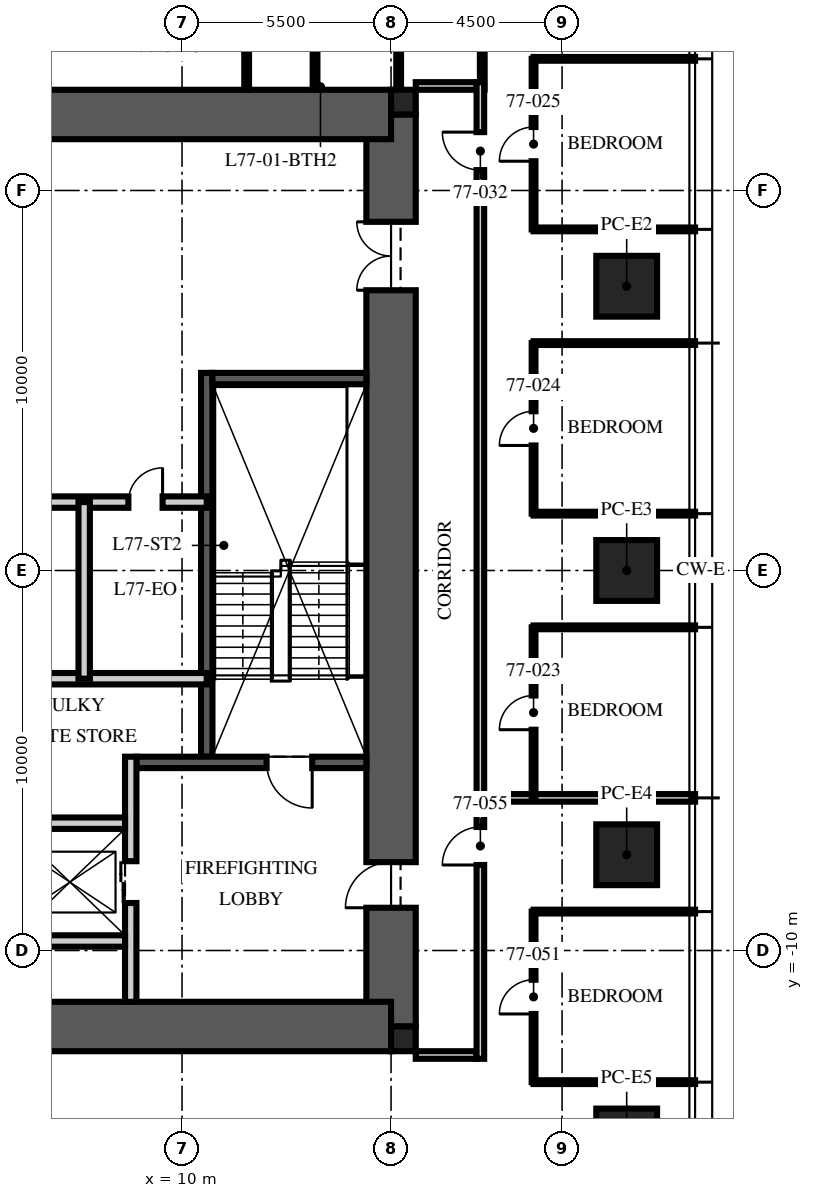
"""IFC4 building model, lengths in metres.
Left out: names, types, materials, properties, quantities, classifications, styles, units other than length and angle.
Written with IfcOpenShell. Run it as: python <this file> out.ifc"""

import sys

from ifc_helpers import new_model, si_unit, direction, frame, frame_2d, origin, origin_2d, place, context, subcontext, project, spatial, rectangle, extrude, element, fill, save


model = new_model("IFC4")
c1 = context("Model", 3, precision=1e-05, world=origin(), true_north=direction((0.0, 1.0)))
c2 = subcontext(c1, "Body", "Model", "MODEL_VIEW")
j1 = project(units=[si_unit("LENGTHUNIT", "METRE"), si_unit("PLANEANGLEUNIT", "RADIAN")], contexts=[c1])
p1 = place(None, origin())
s1 = spatial("IfcSite", under=j1, at=p1, CompositionType="ELEMENT")
p2 = place(p1, origin())
s2 = spatial("IfcBuilding", under=s1, at=p2, CompositionType="ELEMENT")
p3 = place(p2, frame((0.0, 0.0, 308.25)))
s3 = spatial("IfcBuildingStorey", under=s2, at=p3, CompositionType="ELEMENT", Elevation=308.25)
p4 = place(p3, frame((15.5, -12.0, -0.25), z_axis=(0.0, 0.0, 1.0), x_axis=(0.0, 1.0, 0.0)))
e1 = element("IfcWall", 1, at=p4, inside=s3, PredefinedType="SHEAR", context=c2, shape_type="SweptSolid", body=[
    extrude(rectangle(XDim=24.0, YDim=1.3, at=frame_2d((12.0, 0.0))), origin(), (0.0, 0.0, 1.0), 3.75),
])
p5 = place(p4, frame((3.125, 0.0, 0.25)))
e2 = element("IfcOpeningElement", 2, at=p5, cuts=e1, PredefinedType="OPENING", context=c2, shape_type="SweptSolid", body=[
    extrude(rectangle(XDim=1.2, YDim=2.1, at=frame_2d((0.6, 1.05))), frame((0.0, 0.66, 0.0), z_axis=(0.0, -1.0, 0.0), x_axis=(1.0, 0.0, 0.0)), (0.0, 0.0, 1.0), 1.32),
])
p6 = place(p4, frame((19.375, 0.0, 0.25)))
e3 = element("IfcOpeningElement", 3, at=p6, cuts=e1, PredefinedType="OPENING", context=c2, shape_type="SweptSolid", body=[
    extrude(rectangle(XDim=1.8, YDim=2.1, at=frame_2d((0.9, 1.05))), frame((0.0, 0.66, 0.0), z_axis=(0.0, -1.0, 0.0), x_axis=(1.0, 0.0, 0.0)), (0.0, 0.0, 1.0), 1.32),
])
for number, where, z_axis, x_axis in (
    (4, (-15.5, 12.0, -0.25), (0.0, 0.0, 1.0), (1.0, 0.0, 0.0)),
    (5, (-15.5, -12.0, -0.25), (0.0, 0.0, 1.0), (1.0, 0.0, 0.0)),
):
    element("IfcWall", number, at=place(p3, frame(where, z_axis=z_axis, x_axis=x_axis)), inside=s3, PredefinedType="SHEAR", context=c2, shape_type="SweptSolid", body=[
        extrude(rectangle(XDim=31.0, YDim=1.3, at=frame_2d((15.5, 0.0))), origin(), (0.0, 0.0, 1.0), 3.75),
    ])
for number, where, z_axis, x_axis in (
    (6, (15.825, 12.325, -0.25), (0.0, 0.0, 1.0), (1.0, 0.0, 0.0)),
    (7, (15.825, -12.325, -0.25), (0.0, 0.0, 1.0), (1.0, 0.0, 0.0)),
):
    element("IfcColumn", number, at=place(p3, frame(where, z_axis=z_axis, x_axis=x_axis)), inside=s3, PredefinedType="COLUMN", context=c2, shape_type="SweptSolid", body=[
        extrude(rectangle(XDim=0.65, YDim=0.65, at=origin_2d()), origin(), (0.0, 0.0, 1.0), 3.75),
    ])
for number, where, z_axis, x_axis in (
    (8, (21.7, 7.48, 0.0), (0.0, 0.0, 1.0), (0.0, 1.0, 0.0)),
    (9, (21.7, 0.0, 0.0), (0.0, 0.0, 1.0), (0.0, 1.0, 0.0)),
    (10, (21.7, -7.48, 0.0), (0.0, 0.0, 1.0), (0.0, 1.0, 0.0)),
    (11, (21.7, -14.96, 0.0), (0.0, 0.0, 1.0), (0.0, 1.0, 0.0)),
):
    element("IfcColumn", number, at=place(p3, frame(where, z_axis=z_axis, x_axis=x_axis)), inside=s3, PredefinedType="COLUMN", context=c2, shape_type="SweptSolid", body=[
        extrude(rectangle(XDim=1.6, YDim=1.6, at=origin_2d()), origin(), (0.0, 0.0, 1.0), 3.75),
    ])
p7 = place(p3, frame((10.65, -4.9, 0.0), z_axis=(0.0, 0.0, 1.0), x_axis=(0.0, 1.0, 0.0)))
e12 = element("IfcWall", 12, at=p7, inside=s3, PredefinedType="SOLIDWALL", context=c2, shape_type="SweptSolid", body=[
    extrude(rectangle(XDim=10.1, YDim=0.3, at=frame_2d((5.05, 0.0))), origin(), (0.0, 0.0, 1.0), 3.5),
])
p8 = place(p3, frame((14.85, -5.05, 0.0), z_axis=(0.0, 0.0, 1.0), x_axis=(-1.0, 0.0, 0.0)))
e13 = element("IfcWall", 13, at=p8, inside=s3, PredefinedType="SOLIDWALL", context=c2, shape_type="SweptSolid", body=[
    extrude(rectangle(XDim=6.05, YDim=0.3, at=frame_2d((3.025, 0.0))), origin(), (0.0, 0.0, 1.0), 3.5),
])
p9 = place(p8, frame((1.425, 0.0, 0.0)))
e14 = element("IfcOpeningElement", 14, at=p9, cuts=e13, PredefinedType="OPENING", context=c2, shape_type="SweptSolid", body=[
    extrude(rectangle(XDim=1.2, YDim=2.1, at=frame_2d((0.6, 1.05))), frame((0.0, 0.16, 0.0), z_axis=(0.0, -1.0, 0.0), x_axis=(1.0, 0.0, 0.0)), (0.0, 0.0, 1.0), 0.32),
])
p10 = place(p3, frame((14.85, 5.05, 0.0), z_axis=(0.0, 0.0, 1.0), x_axis=(-1.0, 0.0, 0.0)))
e15 = element("IfcWall", 15, at=p10, inside=s3, PredefinedType="SOLIDWALL", context=c2, shape_type="SweptSolid", body=[
    extrude(rectangle(XDim=4.05, YDim=0.3, at=frame_2d((2.025, 0.0))), origin(), (0.0, 0.0, 1.0), 3.5),
])
p11 = place(p3, frame((8.65, -11.35, 0.0), z_axis=(0.0, 0.0, 1.0), x_axis=(0.0, 1.0, 0.0)))
e16 = element("IfcWall", 16, at=p11, inside=s3, PredefinedType="PARTITIONING", context=c2, shape_type="SweptSolid", body=[
    extrude(rectangle(XDim=6.45, YDim=0.3, at=frame_2d((3.225, 0.0))), origin(), (0.0, 0.0, 1.0), 3.5),
])
p12 = place(p11, frame((2.6, 0.0, 0.0)))
e17 = element("IfcOpeningElement", 17, at=p12, cuts=e16, PredefinedType="OPENING", context=c2, shape_type="SweptSolid", body=[
    extrude(rectangle(XDim=1.1, YDim=2.1, at=frame_2d((0.55, 1.05))), frame((0.0, 0.16, 0.0), z_axis=(0.0, -1.0, 0.0), x_axis=(1.0, 0.0, 0.0)), (0.0, 0.0, 1.0), 0.32),
])
p13 = place(p3, frame((-8.5, -6.65, 0.0), z_axis=(0.0, 0.0, 1.0), x_axis=(1.0, 0.0, 0.0)))
e18 = element("IfcWall", 18, at=p13, inside=s3, PredefinedType="PARTITIONING", context=c2, shape_type="SweptSolid", body=[
    extrude(rectangle(XDim=17.0, YDim=0.3, at=frame_2d((8.5, 0.0))), origin(), (0.0, 0.0, 1.0), 3.5),
])
p14 = place(p13, frame((7.8, 0.0, 0.0)))
e19 = element("IfcOpeningElement", 19, at=p14, cuts=e18, PredefinedType="OPENING", context=c2, shape_type="SweptSolid", body=[
    extrude(rectangle(XDim=1.3, YDim=2.4, at=frame_2d((0.65, 1.2))), frame((0.0, 0.16, 0.0), z_axis=(0.0, -1.0, 0.0), x_axis=(1.0, 0.0, 0.0)), (0.0, 0.0, 1.0), 0.32),
])
p15 = place(p13, frame((5.65, 0.0, 0.0)))
e20 = element("IfcOpeningElement", 20, at=p15, cuts=e18, PredefinedType="OPENING", context=c2, shape_type="SweptSolid", body=[
    extrude(rectangle(XDim=0.9, YDim=2.1, at=frame_2d((0.45, 1.05))), frame((0.0, 0.16, 0.0), z_axis=(0.0, -1.0, 0.0), x_axis=(1.0, 0.0, 0.0)), (0.0, 0.0, 1.0), 0.32),
])
p16 = place(p13, frame((10.4, 0.0, 0.0)))
e21 = element("IfcOpeningElement", 21, at=p16, cuts=e18, PredefinedType="OPENING", context=c2, shape_type="SweptSolid", body=[
    extrude(rectangle(XDim=0.9, YDim=2.1, at=frame_2d((0.45, 1.05))), frame((0.0, 0.16, 0.0), z_axis=(0.0, -1.0, 0.0), x_axis=(1.0, 0.0, 0.0)), (0.0, 0.0, 1.0), 0.32),
])
p17 = place(p3, frame((5.6, -9.75, 0.0), z_axis=(0.0, 0.0, 1.0), x_axis=(1.0, 0.0, 0.0)))
e22 = element("IfcWall", 22, at=p17, inside=s3, PredefinedType="PARTITIONING", context=c2, shape_type="SweptSolid", body=[
    extrude(rectangle(XDim=2.9, YDim=0.3, at=frame_2d((1.45, 0.0))), origin(), (0.0, 0.0, 1.0), 3.5),
])
p18 = place(p3, frame((-10.65, 1.8, 0.0), z_axis=(0.0, 0.0, 1.0), x_axis=(1.0, 0.0, 0.0)))
e23 = element("IfcWall", 23, at=p18, inside=s3, PredefinedType="PARTITIONING", context=c2, shape_type="SweptSolid", body=[
    extrude(rectangle(XDim=21.3, YDim=0.3, at=frame_2d((10.65, 0.0))), origin(), (0.0, 0.0, 1.0), 3.5),
])
p19 = place(p18, frame((10.05, 0.0, 0.0)))
e24 = element("IfcOpeningElement", 24, at=p19, cuts=e23, PredefinedType="OPENING", context=c2, shape_type="SweptSolid", body=[
    extrude(rectangle(XDim=1.2, YDim=2.1, at=frame_2d((0.6, 1.05))), frame((0.0, 0.16, 0.0), z_axis=(0.0, -1.0, 0.0), x_axis=(1.0, 0.0, 0.0)), (0.0, 0.0, 1.0), 0.32),
])
p20 = place(p18, frame((19.238, 0.0, 0.0)))
e25 = element("IfcOpeningElement", 25, at=p20, cuts=e23, PredefinedType="OPENING", context=c2, shape_type="SweptSolid", body=[
    extrude(rectangle(XDim=0.9, YDim=2.1, at=frame_2d((0.45, 1.05))), frame((0.0, 0.16, 0.0), z_axis=(0.0, -1.0, 0.0), x_axis=(1.0, 0.0, 0.0)), (0.0, 0.0, 1.0), 0.32),
])
p21 = place(p3, frame((10.65, -2.848, 0.0), z_axis=(0.0, 0.0, 1.0), x_axis=(-1.0, 0.0, 0.0)))
e26 = element("IfcWall", 26, at=p21, inside=s3, PredefinedType="PARTITIONING", context=c2, shape_type="SweptSolid", body=[
    extrude(rectangle(XDim=6.45, YDim=0.3, at=frame_2d((3.225, 0.0))), origin(), (0.0, 0.0, 1.0), 3.5),
])
p22 = place(p3, frame((7.425, -2.848, 0.0), z_axis=(0.0, 0.0, 1.0), x_axis=(0.0, 1.0, 0.0)))
e27 = element("IfcWall", 27, at=p22, inside=s3, PredefinedType="PARTITIONING", context=c2, shape_type="SweptSolid", body=[
    extrude(rectangle(XDim=4.648, YDim=0.3, at=frame_2d((2.324, 0.0))), origin(), (0.0, 0.0, 1.0), 3.5),
])
for number, where, z_axis, x_axis in (
    (28, (16.15, 12.75, 0.0), (0.0, 0.0, 1.0), (1.0, 0.0, 0.0)),
    (29, (16.15, -12.75, 0.0), (0.0, 0.0, 1.0), (1.0, 0.0, 0.0)),
):
    element("IfcWall", number, at=place(p3, frame(where, z_axis=z_axis, x_axis=x_axis)), inside=s3, PredefinedType="PARTITIONING", context=c2, shape_type="SweptSolid", body=[
        extrude(rectangle(XDim=1.6, YDim=0.2, at=frame_2d((0.8, 0.0))), origin(), (0.0, 0.0, 1.0), 2.6),
    ])
p23 = place(p3, frame((17.95, -5.984, 0.0), z_axis=(0.0, 0.0, 1.0), x_axis=(1.0, 0.0, 0.0)))
e30 = element("IfcWall", 30, at=p23, inside=s3, PredefinedType="PARTITIONING", context=c2, shape_type="SweptSolid", body=[
    extrude(rectangle(XDim=5.55, YDim=0.2, at=frame_2d((2.775, 0.0))), origin(), (0.0, 0.0, 1.0), 3.01),
])
for number, where, z_axis, x_axis in (
    (31, (19.25, -1.496, 0.0), (0.0, 0.0, 1.0), (1.0, 0.0, 0.0)),
    (32, (19.25, 1.496, 0.0), (0.0, 0.0, 1.0), (1.0, 0.0, 0.0)),
    (33, (19.25, 5.984, 0.0), (0.0, 0.0, 1.0), (1.0, 0.0, 0.0)),
    (34, (19.25, 8.976, 0.0), (0.0, 0.0, 1.0), (1.0, 0.0, 0.0)),
    (35, (19.25, 13.464, 0.0), (0.0, 0.0, 1.0), (1.0, 0.0, 0.0)),
    (36, (19.25, -13.464, 0.0), (0.0, 0.0, 1.0), (1.0, 0.0, 0.0)),
    (37, (19.25, -8.976, 0.0), (0.0, 0.0, 1.0), (1.0, 0.0, 0.0)),
):
    element("IfcWall", number, at=place(p3, frame(where, z_axis=z_axis, x_axis=x_axis)), inside=s3, PredefinedType="PARTITIONING", context=c2, shape_type="SweptSolid", body=[
        extrude(rectangle(XDim=4.25, YDim=0.1, at=frame_2d((2.125, 0.0))), origin(), (0.0, 0.0, 1.0), 3.01),
    ])
p24 = place(p3, frame((19.25, -5.984, 0.0), z_axis=(0.0, 0.0, 1.0), x_axis=(0.0, 1.0, 0.0)))
e38 = element("IfcWall", 38, at=p24, inside=s3, PredefinedType="PARTITIONING", context=c2, shape_type="SweptSolid", body=[
    extrude(rectangle(XDim=4.488, YDim=0.1, at=frame_2d((2.244, 0.0))), origin(), (0.0, 0.0, 1.0), 2.91),
])
p25 = place(p24, frame((1.794, 0.0, 0.0)))
e39 = element("IfcOpeningElement", 39, at=p25, cuts=e38, PredefinedType="OPENING", context=c2, shape_type="SweptSolid", body=[
    extrude(rectangle(XDim=0.9, YDim=2.1, at=frame_2d((0.45, 1.05))), frame((0.0, 0.06, 0.0), z_axis=(0.0, -1.0, 0.0), x_axis=(1.0, 0.0, 0.0)), (0.0, 0.0, 1.0), 0.12),
])
p26 = place(p3, frame((19.25, 1.496, 0.0), z_axis=(0.0, 0.0, 1.0), x_axis=(0.0, 1.0, 0.0)))
e40 = element("IfcWall", 40, at=p26, inside=s3, PredefinedType="PARTITIONING", context=c2, shape_type="SweptSolid", body=[
    extrude(rectangle(XDim=4.488, YDim=0.1, at=frame_2d((2.244, 0.0))), origin(), (0.0, 0.0, 1.0), 2.91),
])
p27 = place(p26, frame((1.794, 0.0, 0.0)))
e41 = element("IfcOpeningElement", 41, at=p27, cuts=e40, PredefinedType="OPENING", context=c2, shape_type="SweptSolid", body=[
    extrude(rectangle(XDim=0.9, YDim=2.1, at=frame_2d((0.45, 1.05))), frame((0.0, 0.06, 0.0), z_axis=(0.0, -1.0, 0.0), x_axis=(1.0, 0.0, 0.0)), (0.0, 0.0, 1.0), 0.12),
])
p28 = place(p3, frame((19.25, 8.976, 0.0), z_axis=(0.0, 0.0, 1.0), x_axis=(0.0, 1.0, 0.0)))
e42 = element("IfcWall", 42, at=p28, inside=s3, PredefinedType="PARTITIONING", context=c2, shape_type="SweptSolid", body=[
    extrude(rectangle(XDim=4.488, YDim=0.1, at=frame_2d((2.244, 0.0))), origin(), (0.0, 0.0, 1.0), 2.91),
])
p29 = place(p28, frame((1.794, 0.0, 0.0)))
e43 = element("IfcOpeningElement", 43, at=p29, cuts=e42, PredefinedType="OPENING", context=c2, shape_type="SweptSolid", body=[
    extrude(rectangle(XDim=0.9, YDim=2.1, at=frame_2d((0.45, 1.05))), frame((0.0, 0.06, 0.0), z_axis=(0.0, -1.0, 0.0), x_axis=(1.0, 0.0, 0.0)), (0.0, 0.0, 1.0), 0.12),
])
for number, where, z_axis, x_axis in (
    (44, (17.9, 12.65, 0.0), (0.0, 0.0, 1.0), (0.0, 1.0, 0.0)),
    (45, (15.7, 12.65, 0.0), (0.0, 0.0, 1.0), (0.0, 1.0, 0.0)),
):
    element("IfcWall", number, at=place(p3, frame(where, z_axis=z_axis, x_axis=x_axis)), inside=s3, PredefinedType="PARTITIONING", context=c2, shape_type="SweptSolid", body=[
        extrude(rectangle(XDim=4.096, YDim=0.125, at=frame_2d((2.048, 0.0))), origin(), (0.0, 0.0, 1.0), 2.6),
    ])
for number, where, z_axis, x_axis in (
    (46, (13.5, 12.65, 0.0), (0.0, 0.0, 1.0), (0.0, 1.0, 0.0)),
    (47, (11.7, 12.65, 0.0), (0.0, 0.0, 1.0), (0.0, 1.0, 0.0)),
):
    element("IfcWall", number, at=place(p3, frame(where, z_axis=z_axis, x_axis=x_axis)), inside=s3, PredefinedType="PARTITIONING", context=c2, shape_type="SweptSolid", body=[
        extrude(rectangle(XDim=4.096, YDim=0.125, at=frame_2d((2.048, 0.0))), origin(), (0.0, 0.0, 1.0), 3.5),
    ])
p30 = place(p3, frame((19.25, -13.464, 0.0), z_axis=(0.0, 0.0, 1.0), x_axis=(0.0, 1.0, 0.0)))
e48 = element("IfcWall", 48, at=p30, inside=s3, PredefinedType="PARTITIONING", context=c2, shape_type="SweptSolid", body=[
    extrude(rectangle(XDim=4.488, YDim=0.1, at=frame_2d((2.244, 0.0))), origin(), (0.0, 0.0, 1.0), 2.91),
])
p31 = place(p30, frame((1.794, 0.0, 0.0)))
e49 = element("IfcOpeningElement", 49, at=p31, cuts=e48, PredefinedType="OPENING", context=c2, shape_type="SweptSolid", body=[
    extrude(rectangle(XDim=0.9, YDim=2.1, at=frame_2d((0.45, 1.05))), frame((0.0, 0.06, 0.0), z_axis=(0.0, -1.0, 0.0), x_axis=(1.0, 0.0, 0.0)), (0.0, 0.0, 1.0), 0.12),
])
p32 = place(p3, frame((17.85, -12.85, 0.0), z_axis=(0.0, 0.0, 1.0), x_axis=(0.0, 1.0, 0.0)))
e50 = element("IfcWall", 50, at=p32, inside=s3, PredefinedType="PARTITIONING", context=c2, shape_type="SweptSolid", body=[
    extrude(rectangle(XDim=25.7, YDim=0.2, at=frame_2d((12.85, 0.0))), origin(), (0.0, 0.0, 1.0), 2.9),
])
p33 = place(p32, frame((23.386, 0.0, 0.0)))
e51 = element("IfcOpeningElement", 51, at=p33, cuts=e50, PredefinedType="OPENING", context=c2, shape_type="SweptSolid", body=[
    extrude(rectangle(XDim=1.0, YDim=2.2, at=frame_2d((0.5, 1.1))), frame((0.0, 0.11, 0.0), z_axis=(0.0, -1.0, 0.0), x_axis=(1.0, 0.0, 0.0)), (0.0, 0.0, 1.0), 0.22),
])
p34 = place(p32, frame((5.1, 0.0, 0.0)))
e52 = element("IfcOpeningElement", 52, at=p34, cuts=e50, PredefinedType="OPENING", context=c2, shape_type="SweptSolid", body=[
    extrude(rectangle(XDim=1.0, YDim=2.2, at=frame_2d((0.5, 1.1))), frame((0.0, 0.11, 0.0), z_axis=(0.0, -1.0, 0.0), x_axis=(1.0, 0.0, 0.0)), (0.0, 0.0, 1.0), 0.22),
])
p35 = place(p9, origin())
e53 = element("IfcDoor", 53, at=p35, inside=s3, OperationType="SINGLE_SWING_LEFT", PredefinedType="DOOR", context=c2, shape_type="SweptSolid", body=[
    extrude(rectangle(XDim=1.2, YDim=2.1, at=frame_2d((0.6, 1.05))), frame((0.0, 0.025, 0.0), z_axis=(0.0, -1.0, 0.0), x_axis=(1.0, 0.0, 0.0)), (0.0, 0.0, 1.0), 0.05),
])
fill(e14, e53)
p36 = place(p5, origin())
e54 = element("IfcDoor", 54, at=p36, inside=s3, OperationType="SINGLE_SWING_LEFT", PredefinedType="DOOR", context=c2, shape_type="SweptSolid", body=[
    extrude(rectangle(XDim=1.2, YDim=2.1, at=frame_2d((0.6, 1.05))), frame((0.0, 0.025, 0.0), z_axis=(0.0, -1.0, 0.0), x_axis=(1.0, 0.0, 0.0)), (0.0, 0.0, 1.0), 0.05),
])
fill(e2, e54)
p37 = place(p6, origin())
e55 = element("IfcDoor", 55, at=p37, inside=s3, OperationType="DOUBLE_DOOR_SINGLE_SWING", PredefinedType="DOOR", context=c2, shape_type="SweptSolid", body=[
    extrude(rectangle(XDim=1.8, YDim=2.1, at=frame_2d((0.9, 1.05))), frame((0.0, 0.025, 0.0), z_axis=(0.0, -1.0, 0.0), x_axis=(1.0, 0.0, 0.0)), (0.0, 0.0, 1.0), 0.05),
])
fill(e3, e55)
p38 = place(p12, origin())
e56 = element("IfcDoor", 56, at=p38, inside=s3, OperationType="DOUBLE_DOOR_SLIDING", PredefinedType="DOOR", context=c2, shape_type="SweptSolid", body=[
    extrude(rectangle(XDim=1.1, YDim=2.1, at=frame_2d((0.55, 1.05))), frame((0.0, 0.025, 0.0), z_axis=(0.0, -1.0, 0.0), x_axis=(1.0, 0.0, 0.0)), (0.0, 0.0, 1.0), 0.05),
])
fill(e17, e56)
p39 = place(p20, origin())
e57 = element("IfcDoor", 57, at=p39, inside=s3, OperationType="SINGLE_SWING_RIGHT", PredefinedType="DOOR", context=c2, shape_type="SweptSolid", body=[
    extrude(rectangle(XDim=0.9, YDim=2.1, at=frame_2d((0.45, 1.05))), frame((0.0, 0.025, 0.0), z_axis=(0.0, -1.0, 0.0), x_axis=(1.0, 0.0, 0.0)), (0.0, 0.0, 1.0), 0.05),
])
fill(e25, e57)
p40 = place(p25, origin())
e58 = element("IfcDoor", 58, at=p40, inside=s3, OperationType="SINGLE_SWING_LEFT", PredefinedType="DOOR", context=c2, shape_type="SweptSolid", body=[
    extrude(rectangle(XDim=0.9, YDim=2.1, at=frame_2d((0.45, 1.05))), frame((0.0, 0.025, 0.0), z_axis=(0.0, -1.0, 0.0), x_axis=(1.0, 0.0, 0.0)), (0.0, 0.0, 1.0), 0.05),
])
fill(e39, e58)
p41 = place(p27, origin())
e59 = element("IfcDoor", 59, at=p41, inside=s3, OperationType="SINGLE_SWING_LEFT", PredefinedType="DOOR", context=c2, shape_type="SweptSolid", body=[
    extrude(rectangle(XDim=0.9, YDim=2.1, at=frame_2d((0.45, 1.05))), frame((0.0, 0.025, 0.0), z_axis=(0.0, -1.0, 0.0), x_axis=(1.0, 0.0, 0.0)), (0.0, 0.0, 1.0), 0.05),
])
fill(e41, e59)
p42 = place(p29, origin())
e60 = element("IfcDoor", 60, at=p42, inside=s3, OperationType="SINGLE_SWING_LEFT", PredefinedType="DOOR", context=c2, shape_type="SweptSolid", body=[
    extrude(rectangle(XDim=0.9, YDim=2.1, at=frame_2d((0.45, 1.05))), frame((0.0, 0.025, 0.0), z_axis=(0.0, -1.0, 0.0), x_axis=(1.0, 0.0, 0.0)), (0.0, 0.0, 1.0), 0.05),
])
fill(e43, e60)
p43 = place(p33, origin())
e61 = element("IfcDoor", 61, at=p43, inside=s3, OperationType="SINGLE_SWING_RIGHT", PredefinedType="DOOR", context=c2, shape_type="SweptSolid", body=[
    extrude(rectangle(XDim=1.0, YDim=2.2, at=frame_2d((0.5, 1.1))), frame((0.0, 0.025, 0.0), z_axis=(0.0, -1.0, 0.0), x_axis=(1.0, 0.0, 0.0)), (0.0, 0.0, 1.0), 0.05),
])
fill(e51, e61)
p44 = place(p31, origin())
e62 = element("IfcDoor", 62, at=p44, inside=s3, OperationType="SINGLE_SWING_LEFT", PredefinedType="DOOR", context=c2, shape_type="SweptSolid", body=[
    extrude(rectangle(XDim=0.9, YDim=2.1, at=frame_2d((0.45, 1.05))), frame((0.0, 0.025, 0.0), z_axis=(0.0, -1.0, 0.0), x_axis=(1.0, 0.0, 0.0)), (0.0, 0.0, 1.0), 0.05),
])
fill(e49, e62)
p45 = place(p34, origin())
e63 = element("IfcDoor", 63, at=p45, inside=s3, OperationType="SINGLE_SWING_LEFT", PredefinedType="DOOR", context=c2, shape_type="SweptSolid", body=[
    extrude(rectangle(XDim=1.0, YDim=2.2, at=frame_2d((0.5, 1.1))), frame((0.0, 0.025, 0.0), z_axis=(0.0, -1.0, 0.0), x_axis=(1.0, 0.0, 0.0)), (0.0, 0.0, 1.0), 0.05),
])
fill(e52, e63)
save(model, sys.argv[1])
